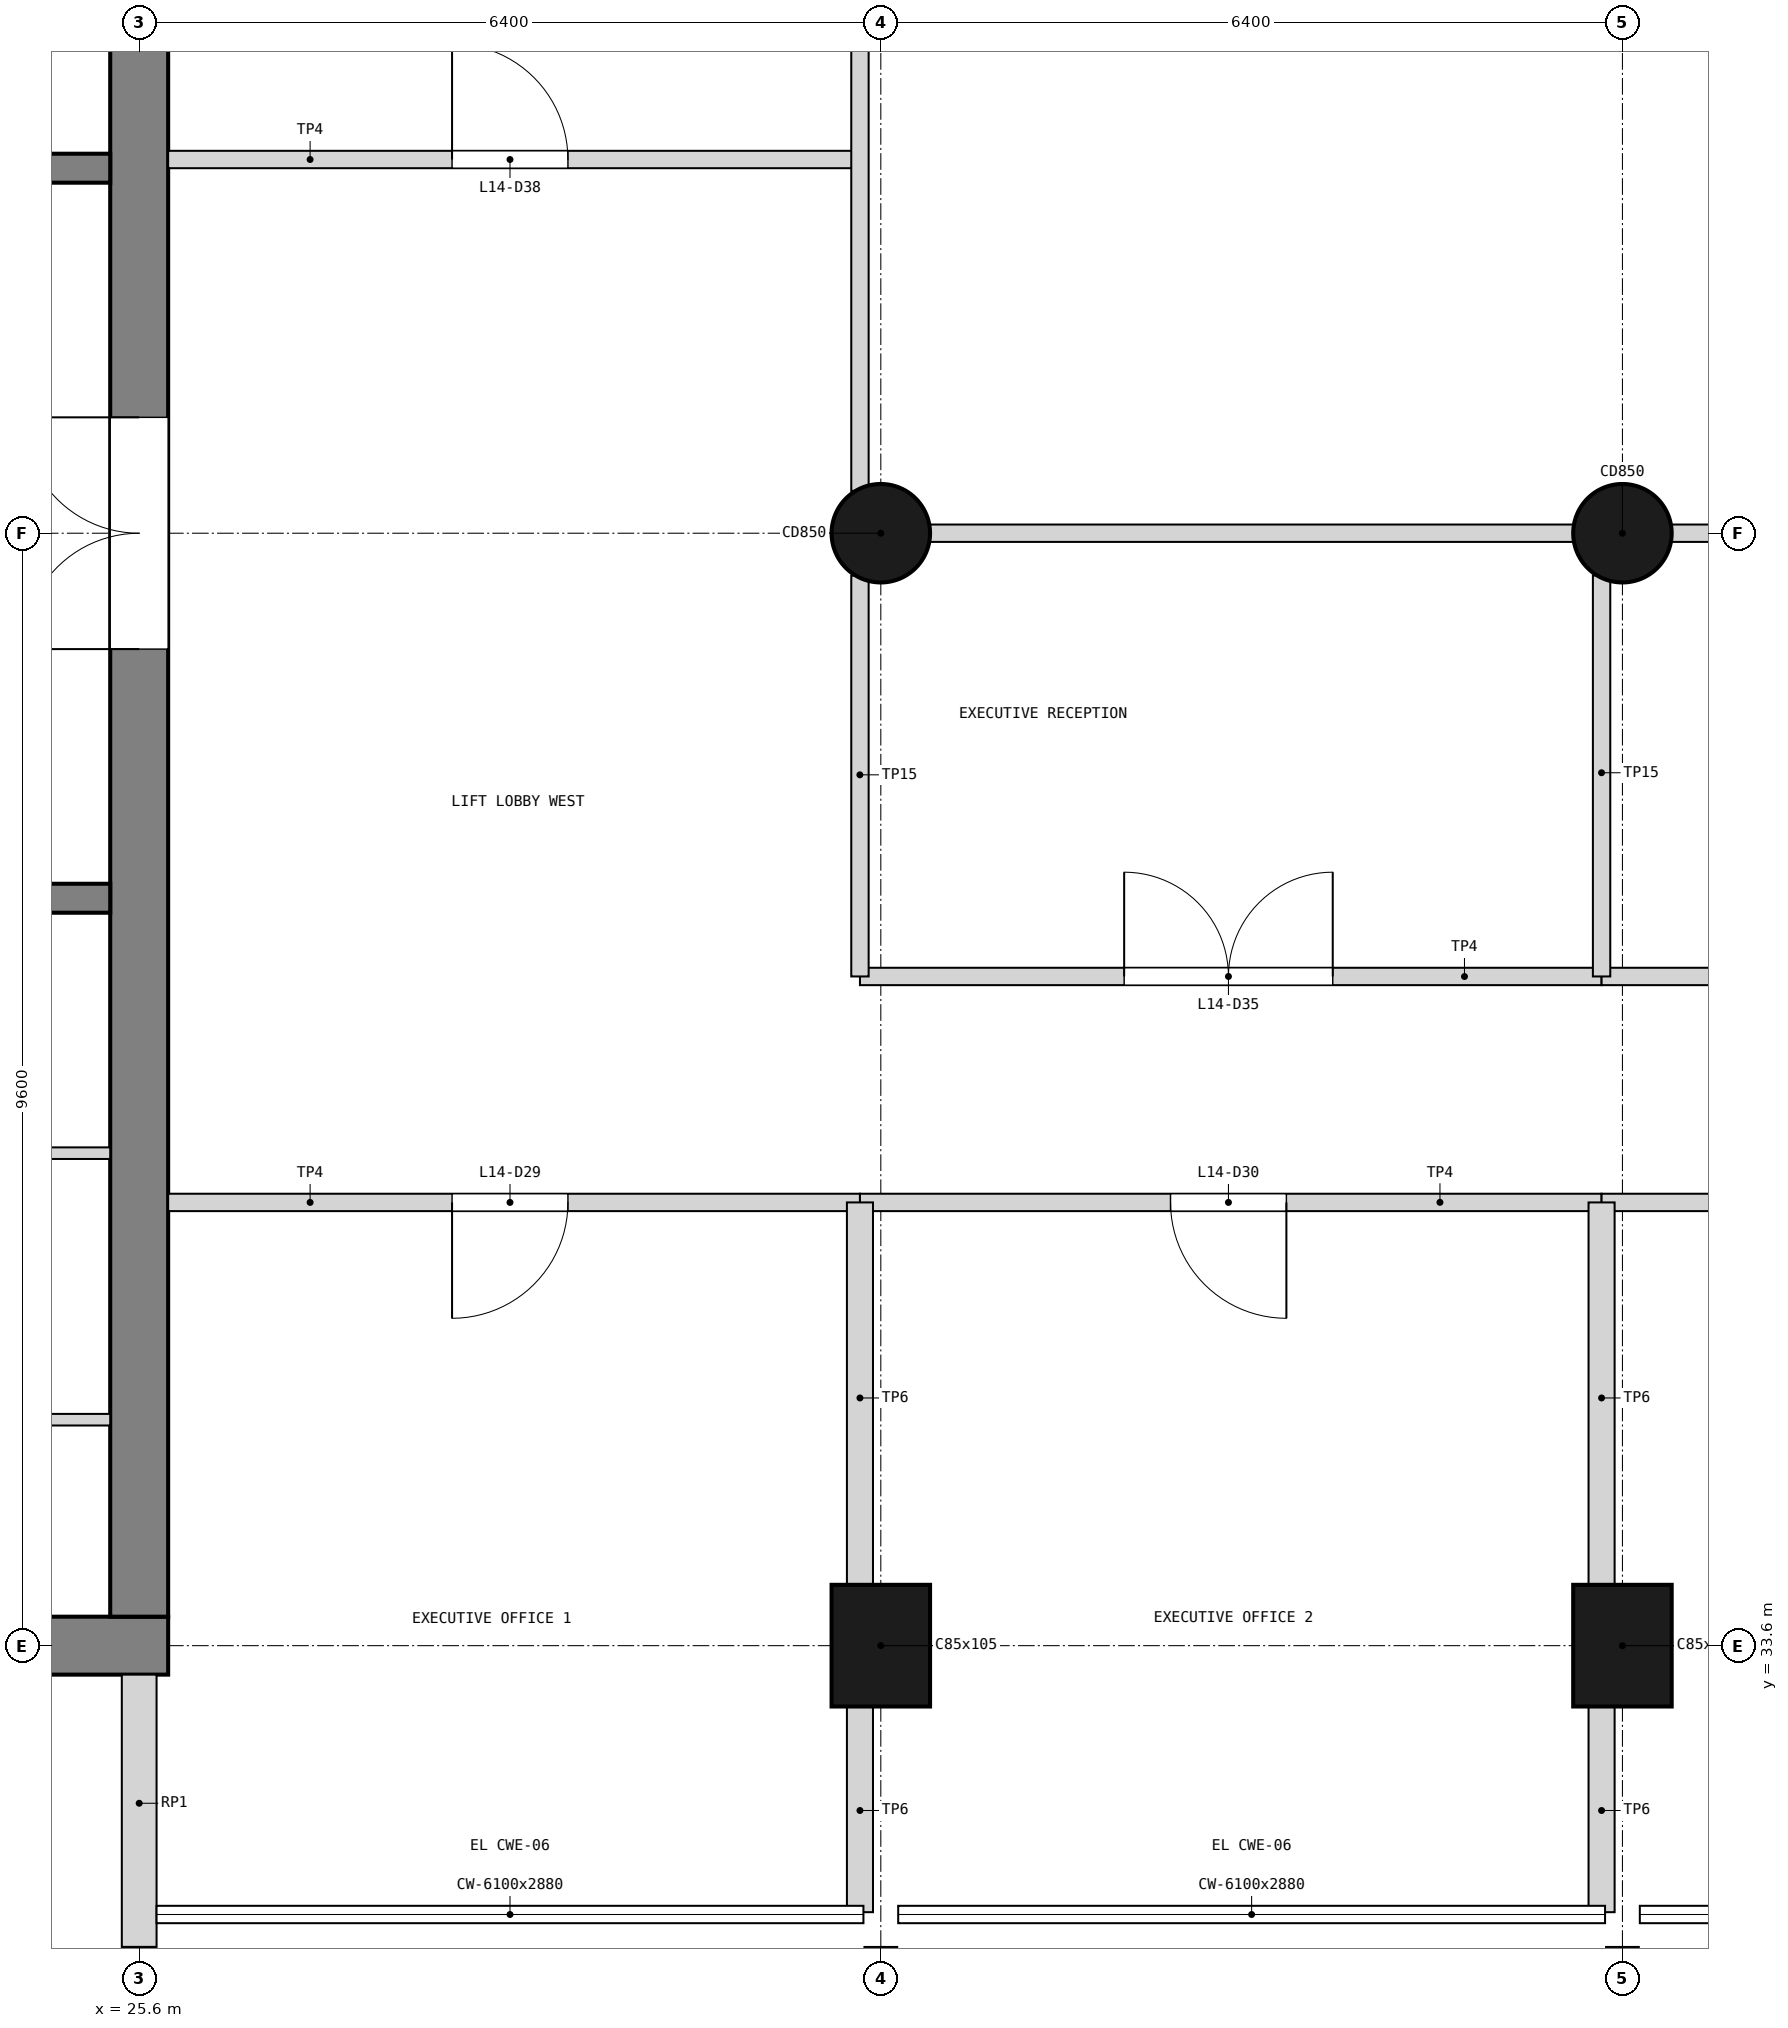
"""IFC4 building model, lengths in metres.
Left out: names, types, materials, properties, quantities, classifications, styles, units other than length and angle.
Written with IfcOpenShell. Run it as: python <this file> out.ifc"""

import sys

from ifc_helpers import new_model, si_unit, direction, frame, frame_2d, origin, origin_2d, place, context, subcontext, project, spatial, rectangle, circle, extrude, element, fill, save


model = new_model("IFC4")
c1 = context("Model", 3, precision=1e-05, world=origin(), true_north=direction((0.0, 1.0)))
c2 = subcontext(c1, "Body", "Model", "MODEL_VIEW")
j1 = project(units=[si_unit("LENGTHUNIT", "METRE"), si_unit("PLANEANGLEUNIT", "RADIAN")], contexts=[c1])
p1 = place(None, origin())
s1 = spatial("IfcSite", under=j1, at=p1, CompositionType="ELEMENT")
p2 = place(p1, origin())
s2 = spatial("IfcBuilding", under=s1, at=p2, CompositionType="ELEMENT")
p3 = place(p2, frame((0.0, 0.0, 56.1)))
s3 = spatial("IfcBuildingStorey", under=s2, at=p3, CompositionType="ELEMENT", Elevation=56.1)
p4 = place(p3, frame((12.55, 33.6, 0.0), z_axis=(0.0, 0.0, 1.0), x_axis=(1.0, 0.0, 0.0)))
e1 = element("IfcWall", 1, at=p4, inside=s3, PredefinedType="SHEAR", context=c2, shape_type="SweptSolid", body=[
    extrude(rectangle(XDim=13.3, YDim=0.5, at=frame_2d((6.65, 0.0))), origin(), (0.0, 0.0, 1.0), 3.9),
])
p5 = place(p4, frame((1.85, 0.0, 1.0)))
e2 = element("IfcOpeningElement", 2, at=p5, cuts=e1, PredefinedType="OPENING", context=c2, shape_type="SweptSolid", body=[
    extrude(rectangle(XDim=0.4, YDim=2.0, at=frame_2d((0.2, 1.0))), frame((0.0, 0.26, 0.0), z_axis=(0.0, -1.0, 0.0), x_axis=(1.0, 0.0, 0.0)), (0.0, 0.0, 1.0), 0.52),
])
p6 = place(p3, frame((25.6, 33.85, 0.0), z_axis=(0.0, 0.0, 1.0), x_axis=(0.0, 1.0, 0.0)))
e3 = element("IfcWall", 3, at=p6, inside=s3, PredefinedType="SHEAR", context=c2, shape_type="SweptSolid", body=[
    extrude(rectangle(XDim=18.7, YDim=0.5, at=frame_2d((9.35, 0.0))), origin(), (0.0, 0.0, 1.0), 3.9),
])
p7 = place(p6, frame((8.35, 0.0, 0.0)))
e4 = element("IfcOpeningElement", 4, at=p7, cuts=e3, PredefinedType="OPENING", context=c2, shape_type="SweptSolid", body=[
    extrude(rectangle(XDim=2.0, YDim=2.1, at=frame_2d((1.0, 1.05))), frame((0.0, 0.26, 0.0), z_axis=(0.0, -1.0, 0.0), x_axis=(1.0, 0.0, 0.0)), (0.0, 0.0, 1.0), 0.52),
])
p8 = place(p3, frame((32.0, 33.6, 0.0), z_axis=(0.0, 0.0, 1.0), x_axis=(1.0, 0.0, 0.0)))
e5 = element("IfcColumn", 5, at=p8, inside=s3, PredefinedType="COLUMN", context=c2, shape_type="SweptSolid", body=[
    extrude(rectangle(XDim=0.85, YDim=1.05, at=origin_2d()), origin(), (0.0, 0.0, 1.0), 3.9),
])
p9 = place(p3, frame((32.0, 43.2, 0.0), z_axis=(0.0, 0.0, 1.0), x_axis=(1.0, 0.0, 0.0)))
e6 = element("IfcColumn", 6, at=p9, inside=s3, PredefinedType="COLUMN", context=c2, shape_type="SweptSolid", body=[
    extrude(circle(Radius=0.425, at=origin_2d()), origin(), (0.0, 0.0, 1.0), 3.9),
])
p10 = place(p3, frame((38.4, 33.6, 0.0), z_axis=(0.0, 0.0, 1.0), x_axis=(1.0, 0.0, 0.0)))
e7 = element("IfcColumn", 7, at=p10, inside=s3, PredefinedType="COLUMN", context=c2, shape_type="SweptSolid", body=[
    extrude(rectangle(XDim=0.85, YDim=1.05, at=origin_2d()), origin(), (0.0, 0.0, 1.0), 3.9),
])
p11 = place(p3, frame((38.4, 43.2, 0.0), z_axis=(0.0, 0.0, 1.0), x_axis=(1.0, 0.0, 0.0)))
e8 = element("IfcColumn", 8, at=p11, inside=s3, PredefinedType="COLUMN", context=c2, shape_type="SweptSolid", body=[
    extrude(circle(Radius=0.425, at=origin_2d()), origin(), (0.0, 0.0, 1.0), 3.9),
])
p12 = place(p3, frame((25.6, 31.0, 0.0), z_axis=(0.0, 0.0, 1.0), x_axis=(0.0, 1.0, 0.0)))
e9 = element("IfcWall", 9, at=p12, inside=s3, PredefinedType="SOLIDWALL", context=c2, shape_type="SweptSolid", body=[
    extrude(rectangle(XDim=2.35, YDim=0.3, at=frame_2d((1.175, 0.0))), origin(), (0.0, 0.0, 1.0), 2.88),
])
for number, where, z_axis, x_axis in (
    (10, (19.875, 40.05, 0.0), (0.0, 0.0, 1.0), (1.0, 0.0, 0.0)),
    (11, (19.875, 46.35, 0.0), (0.0, 0.0, 1.0), (1.0, 0.0, 0.0)),
):
    element("IfcWall", number, at=place(p3, frame(where, z_axis=z_axis, x_axis=x_axis)), inside=s3, PredefinedType="SOLIDWALL", context=c2, shape_type="SweptSolid", body=[
        extrude(rectangle(XDim=5.475, YDim=0.25, at=frame_2d((2.738, 0.0))), origin(), (0.0, 0.0, 1.0), 3.6),
    ])
p13 = place(p3, frame((20.125, 35.55, 0.0), z_axis=(0.0, 0.0, 1.0), x_axis=(1.0, 0.0, 0.0)))
e12 = element("IfcWall", 12, at=p13, inside=s3, PredefinedType="PARTITIONING", context=c2, shape_type="SweptSolid", body=[
    extrude(rectangle(XDim=5.225, YDim=0.1, at=frame_2d((2.613, 0.0))), origin(), (0.0, 0.0, 1.0), 3.6),
])
p14 = place(p3, frame((21.675, 37.85, 0.0), z_axis=(0.0, 0.0, 1.0), x_axis=(1.0, 0.0, 0.0)))
e13 = element("IfcWall", 13, at=p14, inside=s3, PredefinedType="PARTITIONING", context=c2, shape_type="SweptSolid", body=[
    extrude(rectangle(XDim=3.675, YDim=0.1, at=frame_2d((1.837, 0.0))), origin(), (0.0, 0.0, 1.0), 3.6),
])
p15 = place(p3, frame((25.85, 37.425, 0.0), z_axis=(0.0, 0.0, 1.0), x_axis=(1.0, 0.0, 0.0)))
e14 = element("IfcWall", 14, at=p15, inside=s3, PredefinedType="PARTITIONING", context=c2, shape_type="SweptSolid", body=[
    extrude(rectangle(XDim=5.97, YDim=0.15, at=frame_2d((2.985, 0.0))), origin(), (0.0, 0.0, 1.0), 3.68),
])
p16 = place(p15, frame((2.45, 0.0, 0.0)))
e15 = element("IfcOpeningElement", 15, at=p16, cuts=e14, PredefinedType="OPENING", context=c2, shape_type="SweptSolid", body=[
    extrude(rectangle(XDim=1.0, YDim=2.1, at=frame_2d((0.5, 1.05))), frame((0.0, 0.085, 0.0), z_axis=(0.0, -1.0, 0.0), x_axis=(1.0, 0.0, 0.0)), (0.0, 0.0, 1.0), 0.17),
])
p17 = place(p3, frame((31.82, 37.425, 0.0), z_axis=(0.0, 0.0, 1.0), x_axis=(1.0, 0.0, 0.0)))
e16 = element("IfcWall", 16, at=p17, inside=s3, PredefinedType="PARTITIONING", context=c2, shape_type="SweptSolid", body=[
    extrude(rectangle(XDim=6.4, YDim=0.15, at=frame_2d((3.2, 0.0))), origin(), (0.0, 0.0, 1.0), 3.68),
])
p18 = place(p17, frame((2.68, 0.0, 0.0)))
e17 = element("IfcOpeningElement", 17, at=p18, cuts=e16, PredefinedType="OPENING", context=c2, shape_type="SweptSolid", body=[
    extrude(rectangle(XDim=1.0, YDim=2.1, at=frame_2d((0.5, 1.05))), frame((0.0, 0.085, 0.0), z_axis=(0.0, -1.0, 0.0), x_axis=(1.0, 0.0, 0.0)), (0.0, 0.0, 1.0), 0.17),
])
p19 = place(p3, frame((38.22, 37.425, 0.0), z_axis=(0.0, 0.0, 1.0), x_axis=(1.0, 0.0, 0.0)))
e18 = element("IfcWall", 18, at=p19, inside=s3, PredefinedType="PARTITIONING", context=c2, shape_type="SweptSolid", body=[
    extrude(rectangle(XDim=6.4, YDim=0.15, at=frame_2d((3.2, 0.0))), origin(), (0.0, 0.0, 1.0), 3.68),
])
p20 = place(p19, frame((2.68, 0.0, 0.0)))
e19 = element("IfcOpeningElement", 19, at=p20, cuts=e18, PredefinedType="OPENING", context=c2, shape_type="SweptSolid", body=[
    extrude(rectangle(XDim=1.0, YDim=2.1, at=frame_2d((0.5, 1.05))), frame((0.0, 0.085, 0.0), z_axis=(0.0, -1.0, 0.0), x_axis=(1.0, 0.0, 0.0)), (0.0, 0.0, 1.0), 0.17),
])
p21 = place(p3, frame((31.82, 31.3, 0.0), z_axis=(0.0, 0.0, 1.0), x_axis=(0.0, 1.0, 0.0)))
e20 = element("IfcWall", 20, at=p21, inside=s3, PredefinedType="PARTITIONING", context=c2, shape_type="SweptSolid", body=[
    extrude(rectangle(XDim=1.795, YDim=0.225, at=frame_2d((0.897, 0.0))), origin(), (0.0, 0.0, 1.0), 2.78),
])
p22 = place(p3, frame((31.82, 34.105, 0.0), z_axis=(0.0, 0.0, 1.0), x_axis=(0.0, 1.0, 0.0)))
e21 = element("IfcWall", 21, at=p22, inside=s3, PredefinedType="PARTITIONING", context=c2, shape_type="SweptSolid", body=[
    extrude(rectangle(XDim=3.32, YDim=0.225, at=frame_2d((1.66, 0.0))), origin(), (0.0, 0.0, 1.0), 2.78),
])
p23 = place(p3, frame((38.22, 31.3, 0.0), z_axis=(0.0, 0.0, 1.0), x_axis=(0.0, 1.0, 0.0)))
e22 = element("IfcWall", 22, at=p23, inside=s3, PredefinedType="PARTITIONING", context=c2, shape_type="SweptSolid", body=[
    extrude(rectangle(XDim=1.795, YDim=0.225, at=frame_2d((0.897, 0.0))), origin(), (0.0, 0.0, 1.0), 2.78),
])
p24 = place(p3, frame((38.22, 34.105, 0.0), z_axis=(0.0, 0.0, 1.0), x_axis=(0.0, 1.0, 0.0)))
e23 = element("IfcWall", 23, at=p24, inside=s3, PredefinedType="PARTITIONING", context=c2, shape_type="SweptSolid", body=[
    extrude(rectangle(XDim=3.32, YDim=0.225, at=frame_2d((1.66, 0.0))), origin(), (0.0, 0.0, 1.0), 2.78),
])
p25 = place(p3, frame((31.82, 39.375, 0.0), z_axis=(0.0, 0.0, 1.0), x_axis=(1.0, 0.0, 0.0)))
e24 = element("IfcWall", 24, at=p25, inside=s3, PredefinedType="PARTITIONING", context=c2, shape_type="SweptSolid", body=[
    extrude(rectangle(XDim=6.4, YDim=0.15, at=frame_2d((3.2, 0.0))), origin(), (0.0, 0.0, 1.0), 3.68),
])
p26 = place(p25, frame((2.28, 0.0, 0.0)))
e25 = element("IfcOpeningElement", 25, at=p26, cuts=e24, PredefinedType="OPENING", context=c2, shape_type="SweptSolid", body=[
    extrude(rectangle(XDim=1.8, YDim=2.1, at=frame_2d((0.9, 1.05))), frame((0.0, 0.085, 0.0), z_axis=(0.0, -1.0, 0.0), x_axis=(1.0, 0.0, 0.0)), (0.0, 0.0, 1.0), 0.17),
])
p27 = place(p3, frame((38.22, 39.375, 0.0), z_axis=(0.0, 0.0, 1.0), x_axis=(1.0, 0.0, 0.0)))
e26 = element("IfcWall", 26, at=p27, inside=s3, PredefinedType="PARTITIONING", context=c2, shape_type="SweptSolid", body=[
    extrude(rectangle(XDim=19.56, YDim=0.15, at=frame_2d((9.78, 0.0))), origin(), (0.0, 0.0, 1.0), 3.68),
])
p28 = place(p27, frame((4.03, 0.0, 0.0)))
e27 = element("IfcOpeningElement", 27, at=p28, cuts=e26, PredefinedType="OPENING", context=c2, shape_type="SweptSolid", body=[
    extrude(rectangle(XDim=1.8, YDim=2.1, at=frame_2d((0.9, 1.05))), frame((0.0, 0.085, 0.0), z_axis=(0.0, -1.0, 0.0), x_axis=(1.0, 0.0, 0.0)), (0.0, 0.0, 1.0), 0.17),
])
p29 = place(p27, frame((13.73, 0.0, 0.0)))
e28 = element("IfcOpeningElement", 28, at=p29, cuts=e26, PredefinedType="OPENING", context=c2, shape_type="SweptSolid", body=[
    extrude(rectangle(XDim=1.8, YDim=2.1, at=frame_2d((0.9, 1.05))), frame((0.0, 0.085, 0.0), z_axis=(0.0, -1.0, 0.0), x_axis=(1.0, 0.0, 0.0)), (0.0, 0.0, 1.0), 0.17),
])
p30 = place(p3, frame((38.22, 39.375, 0.0), z_axis=(0.0, 0.0, 1.0), x_axis=(0.0, 1.0, 0.0)))
e29 = element("IfcWall", 29, at=p30, inside=s3, PredefinedType="PARTITIONING", context=c2, shape_type="SweptSolid", body=[
    extrude(rectangle(XDim=3.46, YDim=0.15, at=frame_2d((1.73, 0.0))), origin(), (0.0, 0.0, 1.0), 2.78),
])
p31 = place(p3, frame((31.82, 43.2, 0.0), z_axis=(0.0, 0.0, 1.0), x_axis=(1.0, 0.0, 0.0)))
e30 = element("IfcWall", 30, at=p31, inside=s3, PredefinedType="PARTITIONING", context=c2, shape_type="SweptSolid", body=[
    extrude(rectangle(XDim=25.96, YDim=0.15, at=frame_2d((12.98, 0.0))), origin(), (0.0, 0.0, 1.0), 2.88),
])
p32 = place(p31, frame((7.975, 0.0, 0.0)))
e31 = element("IfcOpeningElement", 31, at=p32, cuts=e30, PredefinedType="OPENING", context=c2, shape_type="SweptSolid", body=[
    extrude(rectangle(XDim=1.8, YDim=2.1, at=frame_2d((0.9, 1.05))), frame((0.0, 0.085, 0.0), z_axis=(0.0, -1.0, 0.0), x_axis=(1.0, 0.0, 0.0)), (0.0, 0.0, 1.0), 0.17),
])
p33 = place(p31, frame((13.725, 0.0, 0.0)))
e32 = element("IfcOpeningElement", 32, at=p33, cuts=e30, PredefinedType="OPENING", context=c2, shape_type="SweptSolid", body=[
    extrude(rectangle(XDim=1.8, YDim=2.1, at=frame_2d((0.9, 1.05))), frame((0.0, 0.085, 0.0), z_axis=(0.0, -1.0, 0.0), x_axis=(1.0, 0.0, 0.0)), (0.0, 0.0, 1.0), 0.17),
])
p34 = place(p31, frame((20.192, 0.0, 0.0)))
e33 = element("IfcOpeningElement", 33, at=p34, cuts=e30, PredefinedType="OPENING", context=c2, shape_type="SweptSolid", body=[
    extrude(rectangle(XDim=1.8, YDim=2.1, at=frame_2d((0.9, 1.05))), frame((0.0, 0.085, 0.0), z_axis=(0.0, -1.0, 0.0), x_axis=(1.0, 0.0, 0.0)), (0.0, 0.0, 1.0), 0.17),
])
p35 = place(p3, frame((25.85, 46.425, 0.0), z_axis=(0.0, 0.0, 1.0), x_axis=(1.0, 0.0, 0.0)))
e34 = element("IfcWall", 34, at=p35, inside=s3, PredefinedType="PARTITIONING", context=c2, shape_type="SweptSolid", body=[
    extrude(rectangle(XDim=5.97, YDim=0.15, at=frame_2d((2.985, 0.0))), origin(), (0.0, 0.0, 1.0), 3.68),
])
p36 = place(p35, frame((2.45, 0.0, 0.0)))
e35 = element("IfcOpeningElement", 35, at=p36, cuts=e34, PredefinedType="OPENING", context=c2, shape_type="SweptSolid", body=[
    extrude(rectangle(XDim=1.0, YDim=2.1, at=frame_2d((0.5, 1.05))), frame((0.0, 0.085, 0.0), z_axis=(0.0, -1.0, 0.0), x_axis=(1.0, 0.0, 0.0)), (0.0, 0.0, 1.0), 0.17),
])
p37 = place(p3, frame((31.82, 39.375, 0.0), z_axis=(0.0, 0.0, 1.0), x_axis=(0.0, 1.0, 0.0)))
e36 = element("IfcWall", 36, at=p37, inside=s3, PredefinedType="PARTITIONING", context=c2, shape_type="SweptSolid", body=[
    extrude(rectangle(XDim=3.46, YDim=0.15, at=frame_2d((1.73, 0.0))), origin(), (0.0, 0.0, 1.0), 2.78),
])
p38 = place(p3, frame((31.82, 43.565, 0.0), z_axis=(0.0, 0.0, 1.0), x_axis=(0.0, 1.0, 0.0)))
e37 = element("IfcWall", 37, at=p38, inside=s3, PredefinedType="PARTITIONING", context=c2, shape_type="SweptSolid", body=[
    extrude(rectangle(XDim=8.73, YDim=0.15, at=frame_2d((4.365, 0.0))), origin(), (0.0, 0.0, 1.0), 2.78),
])
p39 = place(p7, origin())
e38 = element("IfcDoor", 38, at=p39, inside=s3, OperationType="DOUBLE_DOOR_SINGLE_SWING", PredefinedType="DOOR", context=c2, shape_type="SweptSolid", body=[
    extrude(rectangle(XDim=2.0, YDim=2.1, at=frame_2d((1.0, 1.05))), frame((0.0, 0.025, 0.0), z_axis=(0.0, -1.0, 0.0), x_axis=(1.0, 0.0, 0.0)), (0.0, 0.0, 1.0), 0.05),
])
fill(e4, e38)
p40 = place(p16, frame((1.0, 0.0, 0.0), z_axis=(0.0, 0.0, 1.0), x_axis=(-1.0, 0.0, 0.0)))
e39 = element("IfcDoor", 39, at=p40, inside=s3, OperationType="SINGLE_SWING_RIGHT", PredefinedType="DOOR", context=c2, shape_type="SweptSolid", body=[
    extrude(rectangle(XDim=1.0, YDim=2.1, at=frame_2d((0.5, 1.05))), frame((0.0, 0.025, 0.0), z_axis=(0.0, -1.0, 0.0), x_axis=(1.0, 0.0, 0.0)), (0.0, 0.0, 1.0), 0.05),
])
fill(e15, e39)
p41 = place(p18, frame((1.0, 0.0, 0.0), z_axis=(0.0, 0.0, 1.0), x_axis=(-1.0, 0.0, 0.0)))
e40 = element("IfcDoor", 40, at=p41, inside=s3, OperationType="SINGLE_SWING_LEFT", PredefinedType="DOOR", context=c2, shape_type="SweptSolid", body=[
    extrude(rectangle(XDim=1.0, YDim=2.1, at=frame_2d((0.5, 1.05))), frame((0.0, 0.025, 0.0), z_axis=(0.0, -1.0, 0.0), x_axis=(1.0, 0.0, 0.0)), (0.0, 0.0, 1.0), 0.05),
])
fill(e17, e40)
p42 = place(p26, origin())
e41 = element("IfcDoor", 41, at=p42, inside=s3, OperationType="DOUBLE_DOOR_SINGLE_SWING", PredefinedType="DOOR", context=c2, shape_type="SweptSolid", body=[
    extrude(rectangle(XDim=1.8, YDim=2.1, at=frame_2d((0.9, 1.05))), frame((0.0, 0.025, 0.0), z_axis=(0.0, -1.0, 0.0), x_axis=(1.0, 0.0, 0.0)), (0.0, 0.0, 1.0), 0.05),
])
fill(e25, e41)
p43 = place(p36, origin())
e42 = element("IfcDoor", 42, at=p43, inside=s3, OperationType="SINGLE_SWING_LEFT", PredefinedType="DOOR", context=c2, shape_type="SweptSolid", body=[
    extrude(rectangle(XDim=1.0, YDim=2.1, at=frame_2d((0.5, 1.05))), frame((0.0, 0.025, 0.0), z_axis=(0.0, -1.0, 0.0), x_axis=(1.0, 0.0, 0.0)), (0.0, 0.0, 1.0), 0.05),
])
fill(e35, e42)
save(model, sys.argv[1])
